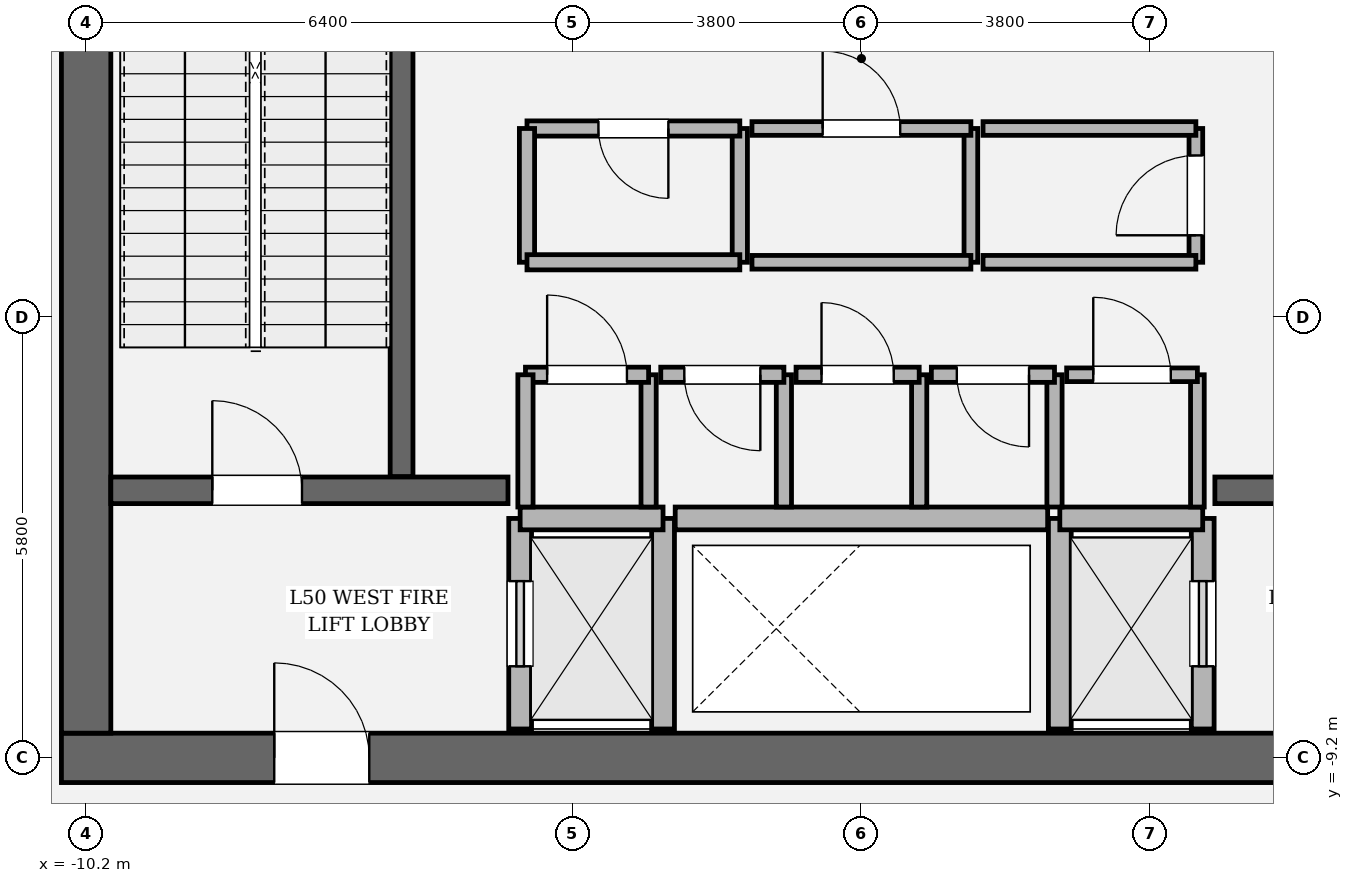
"""IFC4 building model, lengths in metres.
Left out: names, types, materials, properties, quantities, classifications, styles, units other than length and angle.
Written with IfcOpenShell. Run it as: python <this file> out.ifc"""

import sys

from ifc_helpers import new_model, si_unit, direction, frame, frame_2d, origin, place, context, subcontext, project, spatial, rectangle, extrude, element, fill, save


model = new_model("IFC4")
c1 = context("Model", 3, precision=1e-05, world=origin(), true_north=direction((0.0, 1.0)))
c2 = subcontext(c1, "Body", "Model", "MODEL_VIEW")
j1 = project(units=[si_unit("LENGTHUNIT", "METRE"), si_unit("PLANEANGLEUNIT", "RADIAN")], contexts=[c1])
p1 = place(None, origin())
s1 = spatial("IfcSite", under=j1, at=p1, CompositionType="ELEMENT")
p2 = place(p1, origin())
s2 = spatial("IfcBuilding", under=s1, at=p2, CompositionType="ELEMENT")
p3 = place(p2, frame((0.0, 0.0, 212.7)))
s3 = spatial("IfcBuildingStorey", under=s2, at=p3, CompositionType="ELEMENT", Elevation=212.7)
p4 = place(p3, frame((10.525, -9.2, 0.0), z_axis=(0.0, 0.0, 1.0), x_axis=(-1.0, 0.0, 0.0)))
e1 = element("IfcWall", 1, at=p4, inside=s3, PredefinedType="SHEAR", context=c2, shape_type="SweptSolid", body=[
    extrude(rectangle(XDim=21.05, YDim=0.65, at=frame_2d((10.525, 0.0))), origin(), (0.0, 0.0, 1.0), 4.05),
])
p5 = place(p4, frame((2.8, 0.0, 0.0)))
e2 = element("IfcOpeningElement", 2, at=p5, cuts=e1, PredefinedType="OPENING", context=c2, shape_type="SweptSolid", body=[
    extrude(rectangle(XDim=1.25, YDim=2.25, at=frame_2d((0.625, 1.125))), frame((0.0, 0.335, 0.0), z_axis=(0.0, -1.0, 0.0), x_axis=(1.0, 0.0, 0.0)), (0.0, 0.0, 1.0), 0.67),
])
p6 = place(p4, frame((17.0, 0.0, 0.0)))
e3 = element("IfcOpeningElement", 3, at=p6, cuts=e1, PredefinedType="OPENING", context=c2, shape_type="SweptSolid", body=[
    extrude(rectangle(XDim=1.25, YDim=2.25, at=frame_2d((0.625, 1.125))), frame((0.0, 0.335, 0.0), z_axis=(0.0, -1.0, 0.0), x_axis=(1.0, 0.0, 0.0)), (0.0, 0.0, 1.0), 0.67),
])
p7 = place(p3, frame((-10.2, -8.875, 0.0), z_axis=(0.0, 0.0, 1.0), x_axis=(0.0, 1.0, 0.0)))
e4 = element("IfcWall", 4, at=p7, inside=s3, PredefinedType="SHEAR", context=c2, shape_type="SweptSolid", body=[
    extrude(rectangle(XDim=17.75, YDim=0.65, at=frame_2d((8.875, 0.0))), origin(), (0.0, 0.0, 1.0), 4.05),
])
p8 = place(p7, frame((12.665, 0.0, 0.0)))
e5 = element("IfcOpeningElement", 5, at=p8, cuts=e4, PredefinedType="OPENING", context=c2, shape_type="SweptSolid", body=[
    extrude(rectangle(XDim=1.18, YDim=2.2, at=frame_2d((0.59, 1.1))), frame((0.0, 0.335, 0.0), z_axis=(0.0, -1.0, 0.0), x_axis=(1.0, 0.0, 0.0)), (0.0, 0.0, 1.0), 0.67),
])
p9 = place(p3, frame((-6.05, -5.5, 0.0), z_axis=(0.0, 0.0, 1.0), x_axis=(0.0, 1.0, 0.0)))
e6 = element("IfcWall", 6, at=p9, inside=s3, PredefinedType="SOLIDWALL", context=c2, shape_type="SweptSolid", body=[
    extrude(rectangle(XDim=8.95, YDim=0.3, at=frame_2d((4.475, 0.0))), origin(), (0.0, 0.0, 1.0), 4.05),
])
p10 = place(p3, frame((-9.875, -5.68, 0.0), z_axis=(0.0, 0.0, 1.0), x_axis=(1.0, 0.0, 0.0)))
e7 = element("IfcWall", 7, at=p10, inside=s3, PredefinedType="SOLIDWALL", context=c2, shape_type="SweptSolid", body=[
    extrude(rectangle(XDim=5.225, YDim=0.35, at=frame_2d((2.613, 0.0))), origin(), (0.0, 0.0, 1.0), 4.05),
])
p11 = place(p10, frame((1.335, 0.0, 0.0)))
e8 = element("IfcOpeningElement", 8, at=p11, cuts=e7, PredefinedType="OPENING", context=c2, shape_type="SweptSolid", body=[
    extrude(rectangle(XDim=1.18, YDim=2.2, at=frame_2d((0.59, 1.1))), frame((0.0, 0.185, 0.0), z_axis=(0.0, -1.0, 0.0), x_axis=(1.0, 0.0, 0.0)), (0.0, 0.0, 1.0), 0.37),
])
p12 = place(p3, frame((4.65, -5.68, 0.0), z_axis=(0.0, 0.0, 1.0), x_axis=(1.0, 0.0, 0.0)))
e9 = element("IfcWall", 9, at=p12, inside=s3, PredefinedType="SOLIDWALL", context=c2, shape_type="SweptSolid", body=[
    extrude(rectangle(XDim=5.225, YDim=0.35, at=frame_2d((2.613, 0.0))), origin(), (0.0, 0.0, 1.0), 4.05),
])
p13 = place(p12, frame((2.71, 0.0, 0.0)))
e10 = element("IfcOpeningElement", 10, at=p13, cuts=e9, PredefinedType="OPENING", context=c2, shape_type="SweptSolid", body=[
    extrude(rectangle(XDim=1.18, YDim=2.2, at=frame_2d((0.59, 1.1))), frame((0.0, 0.185, 0.0), z_axis=(0.0, -1.0, 0.0), x_axis=(1.0, 0.0, 0.0)), (0.0, 0.0, 1.0), 0.37),
])
p14 = place(p3, frame((-4.49, -8.82, 0.0), z_axis=(0.0, 0.0, 1.0), x_axis=(0.0, 1.0, 0.0)))
e11 = element("IfcWall", 11, at=p14, inside=s3, PredefinedType="SOLIDWALL", context=c2, shape_type="SweptSolid", body=[
    extrude(rectangle(XDim=2.77, YDim=0.3, at=frame_2d((1.385, 0.0))), origin(), (0.0, 0.0, 1.0), 3.83),
])
p15 = place(p14, frame((0.825, 0.0, 0.0)))
e12 = element("IfcOpeningElement", 12, at=p15, cuts=e11, PredefinedType="OPENING", context=c2, shape_type="SweptSolid", body=[
    extrude(rectangle(XDim=1.12, YDim=2.25, at=frame_2d((0.56, 1.125))), frame((0.0, 0.16, 0.0), z_axis=(0.0, -1.0, 0.0), x_axis=(1.0, 0.0, 0.0)), (0.0, 0.0, 1.0), 0.32),
])
p16 = place(p3, frame((-2.61, -8.82, 0.0), z_axis=(0.0, 0.0, 1.0), x_axis=(0.0, 1.0, 0.0)))
e13 = element("IfcWall", 13, at=p16, inside=s3, PredefinedType="SOLIDWALL", context=c2, shape_type="SweptSolid", body=[
    extrude(rectangle(XDim=2.77, YDim=0.3, at=frame_2d((1.385, 0.0))), origin(), (0.0, 0.0, 1.0), 3.83),
])
p17 = place(p3, frame((-4.49, -6.05, 0.0), z_axis=(0.0, 0.0, 1.0), x_axis=(1.0, 0.0, 0.0)))
e14 = element("IfcWall", 14, at=p17, inside=s3, PredefinedType="SOLIDWALL", context=c2, shape_type="SweptSolid", body=[
    extrude(rectangle(XDim=1.88, YDim=0.3, at=frame_2d((0.94, 0.0))), origin(), (0.0, 0.0, 1.0), 3.83),
])
p18 = place(p3, frame((4.49, -8.82, 0.0), z_axis=(0.0, 0.0, 1.0), x_axis=(0.0, 1.0, 0.0)))
e15 = element("IfcWall", 15, at=p18, inside=s3, PredefinedType="SOLIDWALL", context=c2, shape_type="SweptSolid", body=[
    extrude(rectangle(XDim=2.77, YDim=0.3, at=frame_2d((1.385, 0.0))), origin(), (0.0, 0.0, 1.0), 3.83),
])
p19 = place(p18, frame((0.825, 0.0, 0.0)))
e16 = element("IfcOpeningElement", 16, at=p19, cuts=e15, PredefinedType="OPENING", context=c2, shape_type="SweptSolid", body=[
    extrude(rectangle(XDim=1.12, YDim=2.25, at=frame_2d((0.56, 1.125))), frame((0.0, 0.16, 0.0), z_axis=(0.0, -1.0, 0.0), x_axis=(1.0, 0.0, 0.0)), (0.0, 0.0, 1.0), 0.32),
])
p20 = place(p3, frame((2.61, -8.82, 0.0), z_axis=(0.0, 0.0, 1.0), x_axis=(0.0, 1.0, 0.0)))
e17 = element("IfcWall", 17, at=p20, inside=s3, PredefinedType="SOLIDWALL", context=c2, shape_type="SweptSolid", body=[
    extrude(rectangle(XDim=2.77, YDim=0.3, at=frame_2d((1.385, 0.0))), origin(), (0.0, 0.0, 1.0), 3.83),
])
p21 = place(p3, frame((2.61, -6.05, 0.0), z_axis=(0.0, 0.0, 1.0), x_axis=(1.0, 0.0, 0.0)))
e18 = element("IfcWall", 18, at=p21, inside=s3, PredefinedType="SOLIDWALL", context=c2, shape_type="SweptSolid", body=[
    extrude(rectangle(XDim=1.88, YDim=0.3, at=frame_2d((0.94, 0.0))), origin(), (0.0, 0.0, 1.0), 3.83),
])
p22 = place(p3, frame((-2.45, -6.05, 0.0), z_axis=(0.0, 0.0, 1.0), x_axis=(1.0, 0.0, 0.0)))
e19 = element("IfcWall", 19, at=p22, inside=s3, PredefinedType="SOLIDWALL", context=c2, shape_type="SweptSolid", body=[
    extrude(rectangle(XDim=4.9, YDim=0.3, at=frame_2d((2.45, 0.0))), origin(), (0.0, 0.0, 1.0), 3.83),
])
p23 = place(p3, frame((-2.8, -5.9, 0.0), z_axis=(0.0, 0.0, 1.0), x_axis=(0.0, 1.0, 0.0)))
e20 = element("IfcWall", 20, at=p23, inside=s3, PredefinedType="SOLIDWALL", context=c2, shape_type="SweptSolid", body=[
    extrude(rectangle(XDim=1.74, YDim=0.2, at=frame_2d((0.87, 0.0))), origin(), (0.0, 0.0, 1.0), 3.83),
])
p24 = place(p3, frame((-2.8, -4.16, 0.0), z_axis=(0.0, 0.0, 1.0), x_axis=(-1.0, 0.0, 0.0)))
e21 = element("IfcWall", 21, at=p24, inside=s3, PredefinedType="SOLIDWALL", context=c2, shape_type="SweptSolid", body=[
    extrude(rectangle(XDim=1.62, YDim=0.2, at=frame_2d((0.81, 0.0))), origin(), (0.0, 0.0, 1.0), 3.83),
])
p25 = place(p24, frame((0.285, 0.0, 0.0)))
e22 = element("IfcOpeningElement", 22, at=p25, cuts=e21, PredefinedType="OPENING", context=c2, shape_type="SweptSolid", body=[
    extrude(rectangle(XDim=1.05, YDim=2.2, at=frame_2d((0.525, 1.1))), frame((0.0, 0.11, 0.0), z_axis=(0.0, -1.0, 0.0), x_axis=(1.0, 0.0, 0.0)), (0.0, 0.0, 1.0), 0.22),
])
for number, where, z_axis, x_axis in (
    (23, (-4.42, -4.16, 0.0), (0.0, 0.0, 1.0), (0.0, -1.0, 0.0)),
    (24, (-1.02, -5.9, 0.0), (0.0, 0.0, 1.0), (0.0, 1.0, 0.0)),
):
    element("IfcWall", number, at=place(p3, frame(where, z_axis=z_axis, x_axis=x_axis)), inside=s3, PredefinedType="SOLIDWALL", context=c2, shape_type="SweptSolid", body=[
        extrude(rectangle(XDim=1.74, YDim=0.2, at=frame_2d((0.87, 0.0))), origin(), (0.0, 0.0, 1.0), 3.83),
    ])
p26 = place(p3, frame((-1.02, -4.16, 0.0), z_axis=(0.0, 0.0, 1.0), x_axis=(-1.0, 0.0, 0.0)))
e25 = element("IfcWall", 25, at=p26, inside=s3, PredefinedType="SOLIDWALL", context=c2, shape_type="SweptSolid", body=[
    extrude(rectangle(XDim=1.62, YDim=0.2, at=frame_2d((0.81, 0.0))), origin(), (0.0, 0.0, 1.0), 3.83),
])
p27 = place(p26, frame((0.31, 0.0, 0.0)))
e26 = element("IfcOpeningElement", 26, at=p27, cuts=e25, PredefinedType="OPENING", context=c2, shape_type="SweptSolid", body=[
    extrude(rectangle(XDim=1.0, YDim=2.15, at=frame_2d((0.5, 1.075))), frame((0.0, 0.11, 0.0), z_axis=(0.0, -1.0, 0.0), x_axis=(1.0, 0.0, 0.0)), (0.0, 0.0, 1.0), 0.22),
])
p28 = place(p3, frame((0.76, -5.9, 0.0), z_axis=(0.0, 0.0, 1.0), x_axis=(0.0, 1.0, 0.0)))
e27 = element("IfcWall", 27, at=p28, inside=s3, PredefinedType="SOLIDWALL", context=c2, shape_type="SweptSolid", body=[
    extrude(rectangle(XDim=1.74, YDim=0.2, at=frame_2d((0.87, 0.0))), origin(), (0.0, 0.0, 1.0), 3.83),
])
p29 = place(p3, frame((0.76, -4.16, 0.0), z_axis=(0.0, 0.0, 1.0), x_axis=(-1.0, 0.0, 0.0)))
e28 = element("IfcWall", 28, at=p29, inside=s3, PredefinedType="SOLIDWALL", context=c2, shape_type="SweptSolid", body=[
    extrude(rectangle(XDim=1.62, YDim=0.2, at=frame_2d((0.81, 0.0))), origin(), (0.0, 0.0, 1.0), 3.83),
])
p30 = place(p29, frame((0.335, 0.0, 0.0)))
e29 = element("IfcOpeningElement", 29, at=p30, cuts=e28, PredefinedType="OPENING", context=c2, shape_type="SweptSolid", body=[
    extrude(rectangle(XDim=0.95, YDim=2.15, at=frame_2d((0.475, 1.075))), frame((0.0, 0.11, 0.0), z_axis=(0.0, -1.0, 0.0), x_axis=(1.0, 0.0, 0.0)), (0.0, 0.0, 1.0), 0.22),
])
p31 = place(p3, frame((2.54, -5.9, 0.0), z_axis=(0.0, 0.0, 1.0), x_axis=(0.0, 1.0, 0.0)))
e30 = element("IfcWall", 30, at=p31, inside=s3, PredefinedType="SOLIDWALL", context=c2, shape_type="SweptSolid", body=[
    extrude(rectangle(XDim=1.74, YDim=0.2, at=frame_2d((0.87, 0.0))), origin(), (0.0, 0.0, 1.0), 3.83),
])
p32 = place(p3, frame((2.54, -4.16, 0.0), z_axis=(0.0, 0.0, 1.0), x_axis=(-1.0, 0.0, 0.0)))
e31 = element("IfcWall", 31, at=p32, inside=s3, PredefinedType="SOLIDWALL", context=c2, shape_type="SweptSolid", body=[
    extrude(rectangle(XDim=1.62, YDim=0.2, at=frame_2d((0.81, 0.0))), origin(), (0.0, 0.0, 1.0), 3.83),
])
p33 = place(p32, frame((0.335, 0.0, 0.0)))
e32 = element("IfcOpeningElement", 32, at=p33, cuts=e31, PredefinedType="OPENING", context=c2, shape_type="SweptSolid", body=[
    extrude(rectangle(XDim=0.95, YDim=2.15, at=frame_2d((0.475, 1.075))), frame((0.0, 0.11, 0.0), z_axis=(0.0, -1.0, 0.0), x_axis=(1.0, 0.0, 0.0)), (0.0, 0.0, 1.0), 0.22),
])
p34 = place(p3, frame((4.42, -5.9, 0.0), z_axis=(0.0, 0.0, 1.0), x_axis=(0.0, 1.0, 0.0)))
e33 = element("IfcWall", 33, at=p34, inside=s3, PredefinedType="PARTITIONING", context=c2, shape_type="SweptSolid", body=[
    extrude(rectangle(XDim=1.74, YDim=0.18, at=frame_2d((0.87, 0.0))), origin(), (0.0, 0.0, 1.0), 3.83),
])
p35 = place(p3, frame((4.42, -4.16, 0.0), z_axis=(0.0, 0.0, 1.0), x_axis=(-1.0, 0.0, 0.0)))
e34 = element("IfcWall", 34, at=p35, inside=s3, PredefinedType="PARTITIONING", context=c2, shape_type="SweptSolid", body=[
    extrude(rectangle(XDim=1.72, YDim=0.18, at=frame_2d((0.86, 0.0))), origin(), (0.0, 0.0, 1.0), 3.83),
])
p36 = place(p35, frame((0.35, 0.0, 0.0)))
e35 = element("IfcOpeningElement", 35, at=p36, cuts=e34, PredefinedType="OPENING", context=c2, shape_type="SweptSolid", body=[
    extrude(rectangle(XDim=1.02, YDim=2.2, at=frame_2d((0.51, 1.1))), frame((0.0, 0.1, 0.0), z_axis=(0.0, -1.0, 0.0), x_axis=(1.0, 0.0, 0.0)), (0.0, 0.0, 1.0), 0.2),
])
p37 = place(p3, frame((-1.6, -2.68, 0.0), z_axis=(0.0, 0.0, 1.0), x_axis=(0.0, 1.0, 0.0)))
e36 = element("IfcWall", 36, at=p37, inside=s3, PredefinedType="SOLIDWALL", context=c2, shape_type="SweptSolid", body=[
    extrude(rectangle(XDim=1.76, YDim=0.2, at=frame_2d((0.88, 0.0))), origin(), (0.0, 0.0, 1.0), 3.83),
])
p38 = place(p3, frame((-1.6, -0.92, 0.0), z_axis=(0.0, 0.0, 1.0), x_axis=(-1.0, 0.0, 0.0)))
e37 = element("IfcWall", 37, at=p38, inside=s3, PredefinedType="SOLIDWALL", context=c2, shape_type="SweptSolid", body=[
    extrude(rectangle(XDim=2.8, YDim=0.2, at=frame_2d((1.4, 0.0))), origin(), (0.0, 0.0, 1.0), 3.83),
])
p39 = place(p38, frame((0.94, 0.0, 0.0)))
e38 = element("IfcOpeningElement", 38, at=p39, cuts=e37, PredefinedType="OPENING", context=c2, shape_type="SweptSolid", body=[
    extrude(rectangle(XDim=0.92, YDim=2.1, at=frame_2d((0.46, 1.05))), frame((0.0, 0.11, 0.0), z_axis=(0.0, -1.0, 0.0), x_axis=(1.0, 0.0, 0.0)), (0.0, 0.0, 1.0), 0.22),
])
p40 = place(p3, frame((-4.4, -0.92, 0.0), z_axis=(0.0, 0.0, 1.0), x_axis=(0.0, -1.0, 0.0)))
e39 = element("IfcWall", 39, at=p40, inside=s3, PredefinedType="SOLIDWALL", context=c2, shape_type="SweptSolid", body=[
    extrude(rectangle(XDim=1.76, YDim=0.2, at=frame_2d((0.88, 0.0))), origin(), (0.0, 0.0, 1.0), 3.83),
])
p41 = place(p3, frame((-4.4, -2.68, 0.0), z_axis=(0.0, 0.0, 1.0), x_axis=(1.0, 0.0, 0.0)))
e40 = element("IfcWall", 40, at=p41, inside=s3, PredefinedType="SOLIDWALL", context=c2, shape_type="SweptSolid", body=[
    extrude(rectangle(XDim=2.8, YDim=0.2, at=frame_2d((1.4, 0.0))), origin(), (0.0, 0.0, 1.0), 3.83),
])
p42 = place(p3, frame((1.44, -2.68, 0.0), z_axis=(0.0, 0.0, 1.0), x_axis=(0.0, 1.0, 0.0)))
e41 = element("IfcWall", 41, at=p42, inside=s3, PredefinedType="PARTITIONING", context=c2, shape_type="SweptSolid", body=[
    extrude(rectangle(XDim=1.76, YDim=0.18, at=frame_2d((0.88, 0.0))), origin(), (0.0, 0.0, 1.0), 3.83),
])
p43 = place(p3, frame((1.44, -0.92, 0.0), z_axis=(0.0, 0.0, 1.0), x_axis=(-1.0, 0.0, 0.0)))
e42 = element("IfcWall", 42, at=p43, inside=s3, PredefinedType="PARTITIONING", context=c2, shape_type="SweptSolid", body=[
    extrude(rectangle(XDim=2.88, YDim=0.18, at=frame_2d((1.44, 0.0))), origin(), (0.0, 0.0, 1.0), 3.83),
])
p44 = place(p43, frame((0.93, 0.0, 0.0)))
e43 = element("IfcOpeningElement", 43, at=p44, cuts=e42, PredefinedType="OPENING", context=c2, shape_type="SweptSolid", body=[
    extrude(rectangle(XDim=1.02, YDim=2.2, at=frame_2d((0.51, 1.1))), frame((0.0, 0.1, 0.0), z_axis=(0.0, -1.0, 0.0), x_axis=(1.0, 0.0, 0.0)), (0.0, 0.0, 1.0), 0.2),
])
p45 = place(p3, frame((-1.44, -2.68, 0.0), z_axis=(0.0, 0.0, 1.0), x_axis=(1.0, 0.0, 0.0)))
e44 = element("IfcWall", 44, at=p45, inside=s3, PredefinedType="PARTITIONING", context=c2, shape_type="SweptSolid", body=[
    extrude(rectangle(XDim=2.88, YDim=0.18, at=frame_2d((1.44, 0.0))), origin(), (0.0, 0.0, 1.0), 3.83),
])
p46 = place(p3, frame((4.4, -2.68, 0.0), z_axis=(0.0, 0.0, 1.0), x_axis=(0.0, 1.0, 0.0)))
e45 = element("IfcWall", 45, at=p46, inside=s3, PredefinedType="PARTITIONING", context=c2, shape_type="SweptSolid", body=[
    extrude(rectangle(XDim=1.76, YDim=0.18, at=frame_2d((0.88, 0.0))), origin(), (0.0, 0.0, 1.0), 3.83),
])
p47 = place(p46, frame((0.355, 0.0, 0.0)))
e46 = element("IfcOpeningElement", 46, at=p47, cuts=e45, PredefinedType="OPENING", context=c2, shape_type="SweptSolid", body=[
    extrude(rectangle(XDim=1.05, YDim=2.2, at=frame_2d((0.525, 1.1))), frame((0.0, 0.1, 0.0), z_axis=(0.0, -1.0, 0.0), x_axis=(1.0, 0.0, 0.0)), (0.0, 0.0, 1.0), 0.2),
])
for number, where, z_axis, x_axis in (
    (47, (4.4, -0.92, 0.0), (0.0, 0.0, 1.0), (-1.0, 0.0, 0.0)),
    (48, (1.6, -2.68, 0.0), (0.0, 0.0, 1.0), (1.0, 0.0, 0.0)),
):
    element("IfcWall", number, at=place(p3, frame(where, z_axis=z_axis, x_axis=x_axis)), inside=s3, PredefinedType="PARTITIONING", context=c2, shape_type="SweptSolid", body=[
        extrude(rectangle(XDim=2.8, YDim=0.18, at=frame_2d((1.4, 0.0))), origin(), (0.0, 0.0, 1.0), 3.83),
    ])
p48 = place(p11, origin())
e49 = element("IfcDoor", 49, at=p48, inside=s3, OperationType="SINGLE_SWING_LEFT", PredefinedType="DOOR", context=c2, shape_type="SweptSolid", body=[
    extrude(rectangle(XDim=1.18, YDim=2.2, at=frame_2d((0.59, 1.1))), frame((0.0, 0.025, 0.0), z_axis=(0.0, -1.0, 0.0), x_axis=(1.0, 0.0, 0.0)), (0.0, 0.0, 1.0), 0.05),
])
fill(e8, e49)
p49 = place(p6, origin())
e50 = element("IfcDoor", 50, at=p49, inside=s3, OperationType="SINGLE_SWING_RIGHT", PredefinedType="DOOR", context=c2, shape_type="SweptSolid", body=[
    extrude(rectangle(XDim=1.25, YDim=2.25, at=frame_2d((0.625, 1.125))), frame((0.0, 0.025, 0.0), z_axis=(0.0, -1.0, 0.0), x_axis=(1.0, 0.0, 0.0)), (0.0, 0.0, 1.0), 0.05),
])
fill(e3, e50)
p50 = place(p15, origin())
e51 = element("IfcDoor", 51, at=p50, inside=s3, OperationType="SLIDING_TO_LEFT", PredefinedType="DOOR", context=c2, shape_type="SweptSolid", body=[
    extrude(rectangle(XDim=1.12, YDim=2.25, at=frame_2d((0.56, 1.125))), frame((0.0, 0.025, 0.0), z_axis=(0.0, -1.0, 0.0), x_axis=(1.0, 0.0, 0.0)), (0.0, 0.0, 1.0), 0.05),
])
fill(e12, e51)
p51 = place(p19, origin())
e52 = element("IfcDoor", 52, at=p51, inside=s3, OperationType="SLIDING_TO_RIGHT", PredefinedType="DOOR", context=c2, shape_type="SweptSolid", body=[
    extrude(rectangle(XDim=1.12, YDim=2.25, at=frame_2d((0.56, 1.125))), frame((0.0, 0.025, 0.0), z_axis=(0.0, -1.0, 0.0), x_axis=(1.0, 0.0, 0.0)), (0.0, 0.0, 1.0), 0.05),
])
fill(e16, e52)
p52 = place(p25, origin())
e53 = element("IfcDoor", 53, at=p52, inside=s3, OperationType="SINGLE_SWING_RIGHT", PredefinedType="DOOR", context=c2, shape_type="SweptSolid", body=[
    extrude(rectangle(XDim=1.05, YDim=2.2, at=frame_2d((0.525, 1.1))), frame((0.0, 0.025, 0.0), z_axis=(0.0, -1.0, 0.0), x_axis=(1.0, 0.0, 0.0)), (0.0, 0.0, 1.0), 0.05),
])
fill(e22, e53)
p53 = place(p27, origin())
e54 = element("IfcDoor", 54, at=p53, inside=s3, OperationType="SINGLE_SWING_LEFT", PredefinedType="DOOR", context=c2, shape_type="SweptSolid", body=[
    extrude(rectangle(XDim=1.0, YDim=2.15, at=frame_2d((0.5, 1.075))), frame((0.0, 0.025, 0.0), z_axis=(0.0, -1.0, 0.0), x_axis=(1.0, 0.0, 0.0)), (0.0, 0.0, 1.0), 0.05),
])
fill(e26, e54)
p54 = place(p30, origin())
e55 = element("IfcDoor", 55, at=p54, inside=s3, OperationType="SINGLE_SWING_RIGHT", PredefinedType="DOOR", context=c2, shape_type="SweptSolid", body=[
    extrude(rectangle(XDim=0.95, YDim=2.15, at=frame_2d((0.475, 1.075))), frame((0.0, 0.025, 0.0), z_axis=(0.0, -1.0, 0.0), x_axis=(1.0, 0.0, 0.0)), (0.0, 0.0, 1.0), 0.05),
])
fill(e29, e55)
p55 = place(p33, origin())
e56 = element("IfcDoor", 56, at=p55, inside=s3, OperationType="SINGLE_SWING_LEFT", PredefinedType="DOOR", context=c2, shape_type="SweptSolid", body=[
    extrude(rectangle(XDim=0.95, YDim=2.15, at=frame_2d((0.475, 1.075))), frame((0.0, 0.025, 0.0), z_axis=(0.0, -1.0, 0.0), x_axis=(1.0, 0.0, 0.0)), (0.0, 0.0, 1.0), 0.05),
])
fill(e32, e56)
p56 = place(p36, origin())
e57 = element("IfcDoor", 57, at=p56, inside=s3, OperationType="SINGLE_SWING_RIGHT", PredefinedType="DOOR", context=c2, shape_type="SweptSolid", body=[
    extrude(rectangle(XDim=1.02, YDim=2.2, at=frame_2d((0.51, 1.1))), frame((0.0, 0.025, 0.0), z_axis=(0.0, -1.0, 0.0), x_axis=(1.0, 0.0, 0.0)), (0.0, 0.0, 1.0), 0.05),
])
fill(e35, e57)
p57 = place(p39, origin())
e58 = element("IfcDoor", 58, at=p57, inside=s3, OperationType="SINGLE_SWING_LEFT", PredefinedType="DOOR", context=c2, shape_type="SweptSolid", body=[
    extrude(rectangle(XDim=0.92, YDim=2.1, at=frame_2d((0.46, 1.05))), frame((0.0, 0.025, 0.0), z_axis=(0.0, -1.0, 0.0), x_axis=(1.0, 0.0, 0.0)), (0.0, 0.0, 1.0), 0.05),
])
fill(e38, e58)
p58 = place(p44, origin())
e59 = element("IfcDoor", 59, at=p58, inside=s3, OperationType="SINGLE_SWING_RIGHT", PredefinedType="DOOR", context=c2, shape_type="SweptSolid", body=[
    extrude(rectangle(XDim=1.02, YDim=2.2, at=frame_2d((0.51, 1.1))), frame((0.0, 0.025, 0.0), z_axis=(0.0, -1.0, 0.0), x_axis=(1.0, 0.0, 0.0)), (0.0, 0.0, 1.0), 0.05),
])
fill(e43, e59)
p59 = place(p47, origin())
e60 = element("IfcDoor", 60, at=p59, inside=s3, OperationType="SINGLE_SWING_LEFT", PredefinedType="DOOR", context=c2, shape_type="SweptSolid", body=[
    extrude(rectangle(XDim=1.05, YDim=2.2, at=frame_2d((0.525, 1.1))), frame((0.0, 0.025, 0.0), z_axis=(0.0, -1.0, 0.0), x_axis=(1.0, 0.0, 0.0)), (0.0, 0.0, 1.0), 0.05),
])
fill(e46, e60)
save(model, sys.argv[1])
